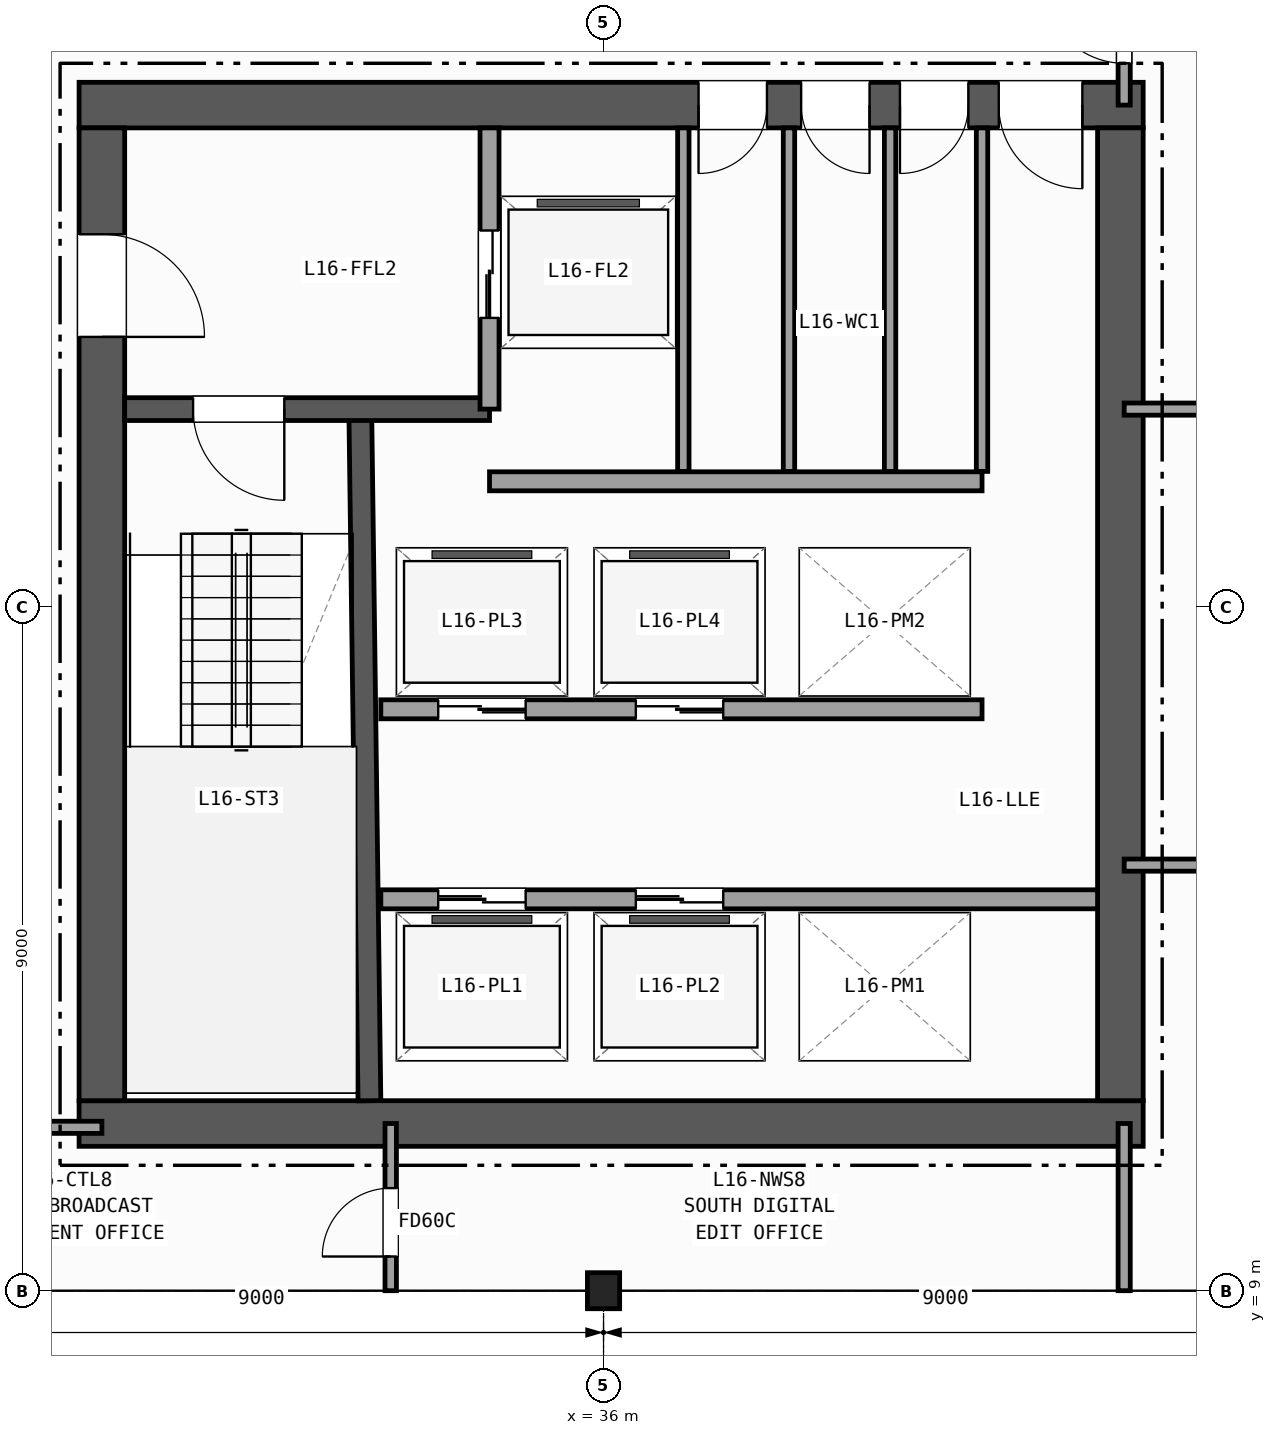
"""IFC4 building model, lengths in metres.
Left out: names, types, materials, properties, quantities, classifications, styles, units other than length and angle.
Written with IfcOpenShell. Run it as: python <this file> out.ifc"""

import sys

from ifc_helpers import new_model, si_unit, direction, frame, frame_2d, origin, origin_2d, place, context, subcontext, project, spatial, rectangle, i_section, extrude, element, fill, save


model = new_model("IFC4")
c1 = context("Model", 3, precision=1e-05, world=origin(), true_north=direction((0.0, 1.0)))
c2 = subcontext(c1, "Body", "Model", "MODEL_VIEW")
j1 = project(units=[si_unit("LENGTHUNIT", "METRE"), si_unit("PLANEANGLEUNIT", "RADIAN")], contexts=[c1])
p1 = place(None, origin())
s1 = spatial("IfcSite", under=j1, at=p1, CompositionType="ELEMENT")
p2 = place(p1, origin())
s2 = spatial("IfcBuilding", under=s1, at=p2, CompositionType="ELEMENT")
p3 = place(p2, frame((0.0, 0.0, 69.3)))
s3 = spatial("IfcBuildingStorey", under=s2, at=p3, CompositionType="ELEMENT", Elevation=69.3)
p4 = place(p3, frame((36.0, 9.0, 0.0), z_axis=(0.0, 0.0, 1.0), x_axis=(1.0, 0.0, 0.0)))
e1 = element("IfcColumn", 1, at=p4, inside=s3, PredefinedType="COLUMN", context=c2, shape_type="SweptSolid", body=[
    extrude(i_section(OverallWidth=0.424, OverallDepth=0.474, WebThickness=0.048, FlangeThickness=0.077, FilletRadius=0.015, at=origin_2d()), origin(), (0.0, 0.0, 1.0), 3.7),
])
p5 = place(p3, frame((29.1, 11.2, 0.0), z_axis=(0.0, 0.0, 1.0), x_axis=(1.0, 0.0, 0.0)))
e2 = element("IfcWall", 2, at=p5, inside=s3, PredefinedType="SHEAR", context=c2, shape_type="SweptSolid", body=[
    extrude(rectangle(XDim=14.0, YDim=0.6, at=frame_2d((7.0, 0.0))), origin(), (0.0, 0.0, 1.0), 3.42),
])
p6 = place(p3, frame((43.1, 24.6, 0.0), z_axis=(0.0, 0.0, 1.0), x_axis=(-1.0, 0.0, 0.0)))
e3 = element("IfcWall", 3, at=p6, inside=s3, PredefinedType="SHEAR", context=c2, shape_type="SweptSolid", body=[
    extrude(rectangle(XDim=14.0, YDim=0.6, at=frame_2d((7.0, 0.0))), origin(), (0.0, 0.0, 1.0), 3.42),
])
p7 = place(p6, frame((0.8, 0.0, 0.0)))
e4 = element("IfcOpeningElement", 4, at=p7, cuts=e3, PredefinedType="OPENING", context=c2, shape_type="SweptSolid", body=[
    extrude(rectangle(XDim=1.1, YDim=2.15, at=frame_2d((0.55, 1.075))), frame((0.0, 0.31, 0.0), z_axis=(0.0, -1.0, 0.0), x_axis=(1.0, 0.0, 0.0)), (0.0, 0.0, 1.0), 0.62),
])
p8 = place(p6, frame((2.3, 0.0, 0.0)))
e5 = element("IfcOpeningElement", 5, at=p8, cuts=e3, PredefinedType="OPENING", context=c2, shape_type="SweptSolid", body=[
    extrude(rectangle(XDim=0.9, YDim=2.1, at=frame_2d((0.45, 1.05))), frame((0.0, 0.31, 0.0), z_axis=(0.0, -1.0, 0.0), x_axis=(1.0, 0.0, 0.0)), (0.0, 0.0, 1.0), 0.62),
])
p9 = place(p6, frame((3.6, 0.0, 0.0)))
e6 = element("IfcOpeningElement", 6, at=p9, cuts=e3, PredefinedType="OPENING", context=c2, shape_type="SweptSolid", body=[
    extrude(rectangle(XDim=0.9, YDim=2.1, at=frame_2d((0.45, 1.05))), frame((0.0, 0.31, 0.0), z_axis=(0.0, -1.0, 0.0), x_axis=(1.0, 0.0, 0.0)), (0.0, 0.0, 1.0), 0.62),
])
p10 = place(p6, frame((4.95, 0.0, 0.0)))
e7 = element("IfcOpeningElement", 7, at=p10, cuts=e3, PredefinedType="OPENING", context=c2, shape_type="SweptSolid", body=[
    extrude(rectangle(XDim=0.9, YDim=2.1, at=frame_2d((0.45, 1.05))), frame((0.0, 0.31, 0.0), z_axis=(0.0, -1.0, 0.0), x_axis=(1.0, 0.0, 0.0)), (0.0, 0.0, 1.0), 0.62),
])
p11 = place(p3, frame((29.4, 24.3, 0.0), z_axis=(0.0, 0.0, 1.0), x_axis=(0.0, -1.0, 0.0)))
e8 = element("IfcWall", 8, at=p11, inside=s3, PredefinedType="SHEAR", context=c2, shape_type="SweptSolid", body=[
    extrude(rectangle(XDim=12.8, YDim=0.6, at=frame_2d((6.4, 0.0))), origin(), (0.0, 0.0, 1.0), 3.42),
])
p12 = place(p11, frame((1.4, 0.0, 0.0)))
e9 = element("IfcOpeningElement", 9, at=p12, cuts=e8, PredefinedType="OPENING", context=c2, shape_type="SweptSolid", body=[
    extrude(rectangle(XDim=1.35, YDim=2.15, at=frame_2d((0.675, 1.075))), frame((0.0, 0.31, 0.0), z_axis=(0.0, -1.0, 0.0), x_axis=(1.0, 0.0, 0.0)), (0.0, 0.0, 1.0), 0.62),
])
p13 = place(p3, frame((42.8, 11.5, 0.0), z_axis=(0.0, 0.0, 1.0), x_axis=(0.0, 1.0, 0.0)))
e10 = element("IfcWall", 10, at=p13, inside=s3, PredefinedType="SHEAR", context=c2, shape_type="SweptSolid", body=[
    extrude(rectangle(XDim=12.8, YDim=0.6, at=frame_2d((6.4, 0.0))), origin(), (0.0, 0.0, 1.0), 3.42),
])
p14 = place(p3, frame((32.92, 11.5, 0.0), z_axis=(0.0, 0.0, 1.0), x_axis=(-0.013244407292, 0.999912288991, 0.0)))
e11 = element("IfcWall", 11, at=p14, inside=s3, PredefinedType="SHEAR", context=c2, shape_type="SweptSolid", body=[
    extrude(rectangle(XDim=9.051, YDim=0.3, at=frame_2d((4.525, 0.0))), origin(), (0.0, 0.0, 1.0), 3.42),
])
p15 = place(p3, frame((34.5, 20.6, 0.0), z_axis=(0.0, 0.0, 1.0), x_axis=(-1.0, 0.0, 0.0)))
e12 = element("IfcWall", 12, at=p15, inside=s3, PredefinedType="SHEAR", context=c2, shape_type="SweptSolid", body=[
    extrude(rectangle(XDim=4.8, YDim=0.3, at=frame_2d((2.4, 0.0))), origin(), (0.0, 0.0, 1.0), 3.42),
])
p16 = place(p15, frame((2.7, 0.0, 0.0)))
e13 = element("IfcOpeningElement", 13, at=p16, cuts=e12, PredefinedType="OPENING", context=c2, shape_type="SweptSolid", body=[
    extrude(rectangle(XDim=1.2, YDim=2.15, at=frame_2d((0.6, 1.075))), frame((0.0, 0.16, 0.0), z_axis=(0.0, -1.0, 0.0), x_axis=(1.0, 0.0, 0.0)), (0.0, 0.0, 1.0), 0.32),
])
p17 = place(p3, frame((34.5, 20.6, 0.0), z_axis=(0.0, 0.0, 1.0), x_axis=(0.0, 1.0, 0.0)))
e14 = element("IfcWall", 14, at=p17, inside=s3, PredefinedType="PARTITIONING", context=c2, shape_type="SweptSolid", body=[
    extrude(rectangle(XDim=3.7, YDim=0.25, at=frame_2d((1.85, 0.0))), origin(), (0.0, 0.0, 1.0), 3.42),
])
p18 = place(p17, frame((1.2, 0.0, 0.0)))
e15 = element("IfcOpeningElement", 15, at=p18, cuts=e14, PredefinedType="OPENING", context=c2, shape_type="SweptSolid", body=[
    extrude(rectangle(XDim=1.15, YDim=2.15, at=frame_2d((0.575, 1.075))), frame((0.0, 0.135, 0.0), z_axis=(0.0, -1.0, 0.0), x_axis=(1.0, 0.0, 0.0)), (0.0, 0.0, 1.0), 0.27),
])
p19 = place(p3, frame((34.5, 19.65, 0.0), z_axis=(0.0, 0.0, 1.0), x_axis=(1.0, 0.0, 0.0)))
e16 = element("IfcWall", 16, at=p19, inside=s3, PredefinedType="PARTITIONING", context=c2, shape_type="SweptSolid", body=[
    extrude(rectangle(XDim=6.48, YDim=0.25, at=frame_2d((3.24, 0.0))), origin(), (0.0, 0.0, 1.0), 3.42),
])
p20 = place(p3, frame((33.07, 14.15, 0.0), z_axis=(0.0, 0.0, 1.0), x_axis=(1.0, 0.0, 0.0)))
e17 = element("IfcWall", 17, at=p20, inside=s3, PredefinedType="PARTITIONING", context=c2, shape_type="SweptSolid", body=[
    extrude(rectangle(XDim=9.43, YDim=0.25, at=frame_2d((4.715, 0.0))), origin(), (0.0, 0.0, 1.0), 3.42),
])
p21 = place(p20, frame((0.755, 0.0, 0.0)))
e18 = element("IfcOpeningElement", 18, at=p21, cuts=e17, PredefinedType="OPENING", context=c2, shape_type="SweptSolid", body=[
    extrude(rectangle(XDim=1.15, YDim=2.15, at=frame_2d((0.575, 1.075))), frame((0.0, 0.135, 0.0), z_axis=(0.0, -1.0, 0.0), x_axis=(1.0, 0.0, 0.0)), (0.0, 0.0, 1.0), 0.27),
])
p22 = place(p20, frame((3.355, 0.0, 0.0)))
e19 = element("IfcOpeningElement", 19, at=p22, cuts=e17, PredefinedType="OPENING", context=c2, shape_type="SweptSolid", body=[
    extrude(rectangle(XDim=1.15, YDim=2.15, at=frame_2d((0.575, 1.075))), frame((0.0, 0.135, 0.0), z_axis=(0.0, -1.0, 0.0), x_axis=(1.0, 0.0, 0.0)), (0.0, 0.0, 1.0), 0.27),
])
p23 = place(p3, frame((40.98, 16.65, 0.0), z_axis=(0.0, 0.0, 1.0), x_axis=(-1.0, 0.0, 0.0)))
e20 = element("IfcWall", 20, at=p23, inside=s3, PredefinedType="PARTITIONING", context=c2, shape_type="SweptSolid", body=[
    extrude(rectangle(XDim=7.91, YDim=0.25, at=frame_2d((3.955, 0.0))), origin(), (0.0, 0.0, 1.0), 3.42),
])
p24 = place(p23, frame((6.005, 0.0, 0.0)))
e21 = element("IfcOpeningElement", 21, at=p24, cuts=e20, PredefinedType="OPENING", context=c2, shape_type="SweptSolid", body=[
    extrude(rectangle(XDim=1.15, YDim=2.15, at=frame_2d((0.575, 1.075))), frame((0.0, 0.135, 0.0), z_axis=(0.0, -1.0, 0.0), x_axis=(1.0, 0.0, 0.0)), (0.0, 0.0, 1.0), 0.27),
])
p25 = place(p23, frame((3.405, 0.0, 0.0)))
e22 = element("IfcOpeningElement", 22, at=p25, cuts=e20, PredefinedType="OPENING", context=c2, shape_type="SweptSolid", body=[
    extrude(rectangle(XDim=1.15, YDim=2.15, at=frame_2d((0.575, 1.075))), frame((0.0, 0.135, 0.0), z_axis=(0.0, -1.0, 0.0), x_axis=(1.0, 0.0, 0.0)), (0.0, 0.0, 1.0), 0.27),
])
for number, where, z_axis, x_axis in (
    (23, (37.05, 19.78, 0.0), (0.0, 0.0, 1.0), (0.0, 1.0, 0.0)),
    (24, (38.44, 19.78, 0.0), (0.0, 0.0, 1.0), (0.0, 1.0, 0.0)),
    (25, (39.77, 19.78, 0.0), (0.0, 0.0, 1.0), (0.0, 1.0, 0.0)),
    (26, (40.98, 19.78, 0.0), (0.0, 0.0, 1.0), (0.0, 1.0, 0.0)),
):
    element("IfcWall", number, at=place(p3, frame(where, z_axis=z_axis, x_axis=x_axis)), inside=s3, PredefinedType="PARTITIONING", context=c2, shape_type="SweptSolid", body=[
        extrude(rectangle(XDim=4.52, YDim=0.15, at=frame_2d((2.26, 0.0))), origin(), (0.0, 0.0, 1.0), 3.42),
    ])
p26 = place(p3, frame((24.65, 11.15, 0.0), z_axis=(0.0, 0.0, 1.0), x_axis=(1.0, 0.0, 0.0)))
e27 = element("IfcWall", 27, at=p26, inside=s3, PredefinedType="PARTITIONING", context=c2, shape_type="SweptSolid", body=[
    extrude(rectangle(XDim=4.75, YDim=0.16, at=frame_2d((2.375, 0.0))), origin(), (0.0, 0.0, 1.0), 2.792),
])
p27 = place(p26, frame((1.2, 0.0, 0.0)))
e28 = element("IfcOpeningElement", 28, at=p27, cuts=e27, PredefinedType="OPENING", context=c2, shape_type="SweptSolid", body=[
    extrude(rectangle(XDim=0.95, YDim=2.1, at=frame_2d((0.475, 1.05))), frame((0.0, 0.09, 0.0), z_axis=(0.0, -1.0, 0.0), x_axis=(1.0, 0.0, 0.0)), (0.0, 0.0, 1.0), 0.18),
])
p28 = place(p3, frame((33.2, 9.0, 0.0), z_axis=(0.0, 0.0, 1.0), x_axis=(0.0, 1.0, 0.0)))
e29 = element("IfcWall", 29, at=p28, inside=s3, PredefinedType="PARTITIONING", context=c2, shape_type="SweptSolid", body=[
    extrude(rectangle(XDim=2.2, YDim=0.15, at=frame_2d((1.1, 0.0))), origin(), (0.0, 0.0, 1.0), 2.627),
])
p29 = place(p28, frame((0.45, 0.0, 0.0)))
e30 = element("IfcOpeningElement", 30, at=p29, cuts=e29, PredefinedType="OPENING", context=c2, shape_type="SweptSolid", body=[
    extrude(rectangle(XDim=0.9, YDim=2.1, at=frame_2d((0.45, 1.05))), frame((0.0, 0.085, 0.0), z_axis=(0.0, -1.0, 0.0), x_axis=(1.0, 0.0, 0.0)), (0.0, 0.0, 1.0), 0.17),
])
p30 = place(p3, frame((42.85, 9.0, 0.0), z_axis=(0.0, 0.0, 1.0), x_axis=(0.0, 1.0, 0.0)))
e31 = element("IfcWall", 31, at=p30, inside=s3, PredefinedType="PARTITIONING", context=c2, shape_type="SweptSolid", body=[
    extrude(rectangle(XDim=2.2, YDim=0.16, at=frame_2d((1.1, 0.0))), origin(), (0.0, 0.0, 1.0), 2.627),
])
p31 = place(p3, frame((42.85, 24.6, 0.0), z_axis=(0.0, 0.0, 1.0), x_axis=(0.0, 1.0, 0.0)))
e32 = element("IfcWall", 32, at=p31, inside=s3, PredefinedType="PARTITIONING", context=c2, shape_type="SweptSolid", body=[
    extrude(rectangle(XDim=2.4, YDim=0.16, at=frame_2d((1.2, 0.0))), origin(), (0.0, 0.0, 1.0), 2.627),
])
p32 = place(p31, frame((0.55, 0.0, 0.0)))
e33 = element("IfcOpeningElement", 33, at=p32, cuts=e32, PredefinedType="OPENING", context=c2, shape_type="SweptSolid", body=[
    extrude(rectangle(XDim=1.05, YDim=2.15, at=frame_2d((0.525, 1.075))), frame((0.0, 0.09, 0.0), z_axis=(0.0, -1.0, 0.0), x_axis=(1.0, 0.0, 0.0)), (0.0, 0.0, 1.0), 0.18),
])
p33 = place(p3, frame((42.85, 14.6, 0.0), z_axis=(0.0, 0.0, 1.0), x_axis=(1.0, 0.0, 0.0)))
e34 = element("IfcWall", 34, at=p33, inside=s3, PredefinedType="PARTITIONING", context=c2, shape_type="SweptSolid", body=[
    extrude(rectangle(XDim=20.5, YDim=0.16, at=frame_2d((10.25, 0.0))), origin(), (0.0, 0.0, 1.0), 3.42),
])
p34 = place(p33, frame((3.4, 0.0, 0.0)))
e35 = element("IfcOpeningElement", 35, at=p34, cuts=e34, PredefinedType="OPENING", context=c2, shape_type="SweptSolid", body=[
    extrude(rectangle(XDim=1.2, YDim=2.15, at=frame_2d((0.6, 1.075))), frame((0.0, 0.09, 0.0), z_axis=(0.0, -1.0, 0.0), x_axis=(1.0, 0.0, 0.0)), (0.0, 0.0, 1.0), 0.18),
])
p35 = place(p3, frame((42.85, 20.6, 0.0), z_axis=(0.0, 0.0, 1.0), x_axis=(1.0, 0.0, 0.0)))
e36 = element("IfcWall", 36, at=p35, inside=s3, PredefinedType="PARTITIONING", context=c2, shape_type="SweptSolid", body=[
    extrude(rectangle(XDim=20.582, YDim=0.16, at=frame_2d((10.291, 0.0))), origin(), (0.0, 0.0, 1.0), 3.42),
])
p36 = place(p35, frame((3.4, 0.0, 0.0)))
e37 = element("IfcOpeningElement", 37, at=p36, cuts=e36, PredefinedType="OPENING", context=c2, shape_type="SweptSolid", body=[
    extrude(rectangle(XDim=0.86, YDim=2.05, at=frame_2d((0.43, 1.025))), frame((0.0, 0.09, 0.0), z_axis=(0.0, -1.0, 0.0), x_axis=(1.0, 0.0, 0.0)), (0.0, 0.0, 1.0), 0.18),
])
p37 = place(p16, origin())
e38 = element("IfcDoor", 38, at=p37, inside=s3, OperationType="SINGLE_SWING_LEFT", PredefinedType="DOOR", context=c2, shape_type="SweptSolid", body=[
    extrude(rectangle(XDim=1.2, YDim=2.15, at=frame_2d((0.6, 1.075))), frame((0.0, 0.025, 0.0), z_axis=(0.0, -1.0, 0.0), x_axis=(1.0, 0.0, 0.0)), (0.0, 0.0, 1.0), 0.05),
])
fill(e13, e38)
p38 = place(p12, origin())
e39 = element("IfcDoor", 39, at=p38, inside=s3, OperationType="SINGLE_SWING_RIGHT", PredefinedType="DOOR", context=c2, shape_type="SweptSolid", body=[
    extrude(rectangle(XDim=1.35, YDim=2.15, at=frame_2d((0.675, 1.075))), frame((0.0, 0.025, 0.0), z_axis=(0.0, -1.0, 0.0), x_axis=(1.0, 0.0, 0.0)), (0.0, 0.0, 1.0), 0.05),
])
fill(e9, e39)
p39 = place(p7, origin())
e40 = element("IfcDoor", 40, at=p39, inside=s3, OperationType="SINGLE_SWING_LEFT", PredefinedType="DOOR", context=c2, shape_type="SweptSolid", body=[
    extrude(rectangle(XDim=1.1, YDim=2.15, at=frame_2d((0.55, 1.075))), frame((0.0, 0.025, 0.0), z_axis=(0.0, -1.0, 0.0), x_axis=(1.0, 0.0, 0.0)), (0.0, 0.0, 1.0), 0.05),
])
fill(e4, e40)
p40 = place(p8, origin())
e41 = element("IfcDoor", 41, at=p40, inside=s3, OperationType="SINGLE_SWING_RIGHT", PredefinedType="DOOR", context=c2, shape_type="SweptSolid", body=[
    extrude(rectangle(XDim=0.9, YDim=2.1, at=frame_2d((0.45, 1.05))), frame((0.0, 0.025, 0.0), z_axis=(0.0, -1.0, 0.0), x_axis=(1.0, 0.0, 0.0)), (0.0, 0.0, 1.0), 0.05),
])
fill(e5, e41)
p41 = place(p9, origin())
e42 = element("IfcDoor", 42, at=p41, inside=s3, OperationType="SINGLE_SWING_LEFT", PredefinedType="DOOR", context=c2, shape_type="SweptSolid", body=[
    extrude(rectangle(XDim=0.9, YDim=2.1, at=frame_2d((0.45, 1.05))), frame((0.0, 0.025, 0.0), z_axis=(0.0, -1.0, 0.0), x_axis=(1.0, 0.0, 0.0)), (0.0, 0.0, 1.0), 0.05),
])
fill(e6, e42)
p42 = place(p10, origin())
e43 = element("IfcDoor", 43, at=p42, inside=s3, OperationType="SINGLE_SWING_RIGHT", PredefinedType="DOOR", context=c2, shape_type="SweptSolid", body=[
    extrude(rectangle(XDim=0.9, YDim=2.1, at=frame_2d((0.45, 1.05))), frame((0.0, 0.025, 0.0), z_axis=(0.0, -1.0, 0.0), x_axis=(1.0, 0.0, 0.0)), (0.0, 0.0, 1.0), 0.05),
])
fill(e7, e43)
p43 = place(p18, origin())
e44 = element("IfcDoor", 44, at=p43, inside=s3, OperationType="DOUBLE_DOOR_SLIDING", PredefinedType="DOOR", context=c2, shape_type="SweptSolid", body=[
    extrude(rectangle(XDim=1.15, YDim=2.15, at=frame_2d((0.575, 1.075))), frame((0.0, 0.025, 0.0), z_axis=(0.0, -1.0, 0.0), x_axis=(1.0, 0.0, 0.0)), (0.0, 0.0, 1.0), 0.05),
])
fill(e15, e44)
p44 = place(p21, origin())
e45 = element("IfcDoor", 45, at=p44, inside=s3, OperationType="DOUBLE_DOOR_SLIDING", PredefinedType="DOOR", context=c2, shape_type="SweptSolid", body=[
    extrude(rectangle(XDim=1.15, YDim=2.15, at=frame_2d((0.575, 1.075))), frame((0.0, 0.025, 0.0), z_axis=(0.0, -1.0, 0.0), x_axis=(1.0, 0.0, 0.0)), (0.0, 0.0, 1.0), 0.05),
])
fill(e18, e45)
p45 = place(p22, origin())
e46 = element("IfcDoor", 46, at=p45, inside=s3, OperationType="DOUBLE_DOOR_SLIDING", PredefinedType="DOOR", context=c2, shape_type="SweptSolid", body=[
    extrude(rectangle(XDim=1.15, YDim=2.15, at=frame_2d((0.575, 1.075))), frame((0.0, 0.025, 0.0), z_axis=(0.0, -1.0, 0.0), x_axis=(1.0, 0.0, 0.0)), (0.0, 0.0, 1.0), 0.05),
])
fill(e19, e46)
p46 = place(p24, origin())
e47 = element("IfcDoor", 47, at=p46, inside=s3, OperationType="DOUBLE_DOOR_SLIDING", PredefinedType="DOOR", context=c2, shape_type="SweptSolid", body=[
    extrude(rectangle(XDim=1.15, YDim=2.15, at=frame_2d((0.575, 1.075))), frame((0.0, 0.025, 0.0), z_axis=(0.0, -1.0, 0.0), x_axis=(1.0, 0.0, 0.0)), (0.0, 0.0, 1.0), 0.05),
])
fill(e21, e47)
p47 = place(p25, origin())
e48 = element("IfcDoor", 48, at=p47, inside=s3, OperationType="DOUBLE_DOOR_SLIDING", PredefinedType="DOOR", context=c2, shape_type="SweptSolid", body=[
    extrude(rectangle(XDim=1.15, YDim=2.15, at=frame_2d((0.575, 1.075))), frame((0.0, 0.025, 0.0), z_axis=(0.0, -1.0, 0.0), x_axis=(1.0, 0.0, 0.0)), (0.0, 0.0, 1.0), 0.05),
])
fill(e22, e48)
p48 = place(p29, origin())
e49 = element("IfcDoor", 49, at=p48, inside=s3, OperationType="SINGLE_SWING_LEFT", PredefinedType="DOOR", context=c2, shape_type="SweptSolid", body=[
    extrude(rectangle(XDim=0.9, YDim=2.1, at=frame_2d((0.45, 1.05))), frame((0.0, 0.025, 0.0), z_axis=(0.0, -1.0, 0.0), x_axis=(1.0, 0.0, 0.0)), (0.0, 0.0, 1.0), 0.05),
])
fill(e30, e49)
p49 = place(p32, origin())
e50 = element("IfcDoor", 50, at=p49, inside=s3, OperationType="SINGLE_SWING_RIGHT", PredefinedType="DOOR", context=c2, shape_type="SweptSolid", body=[
    extrude(rectangle(XDim=1.05, YDim=2.15, at=frame_2d((0.525, 1.075))), frame((0.0, 0.025, 0.0), z_axis=(0.0, -1.0, 0.0), x_axis=(1.0, 0.0, 0.0)), (0.0, 0.0, 1.0), 0.05),
])
fill(e33, e50)
save(model, sys.argv[1])
